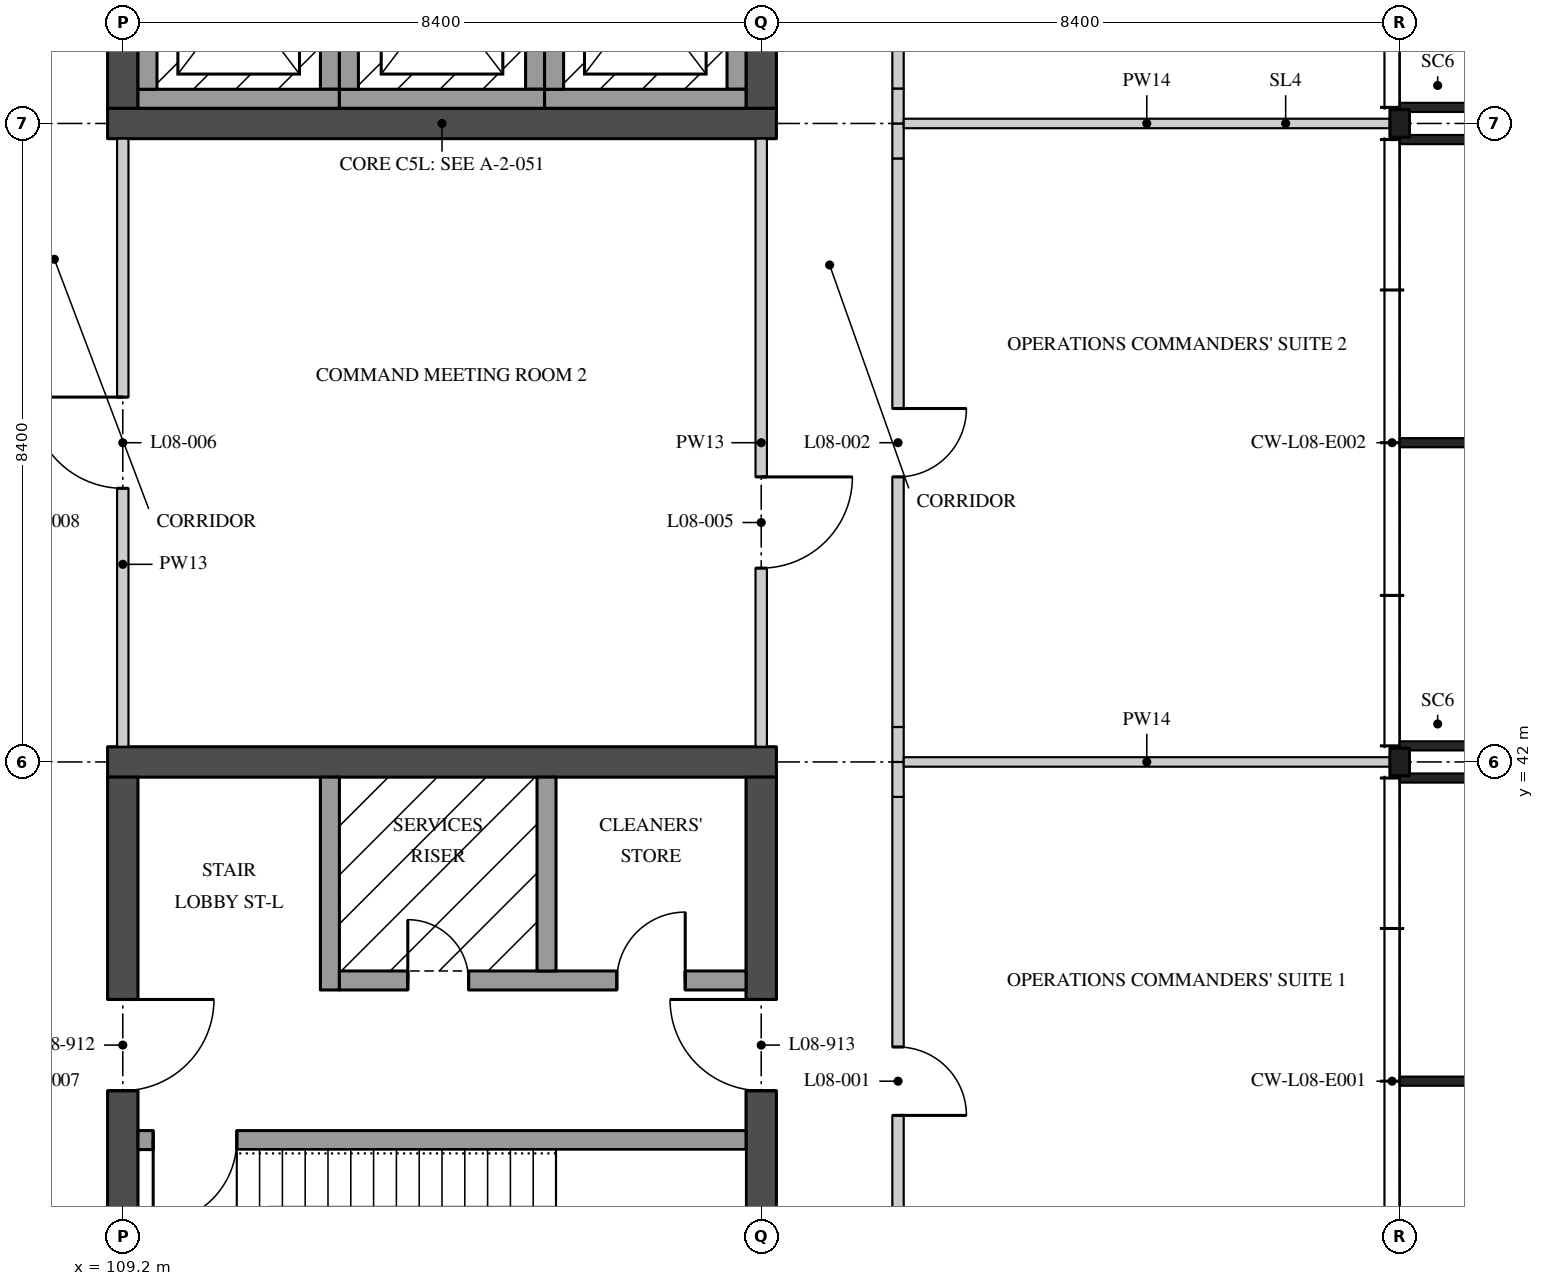
"""IFC4 building model, lengths in metres.
Left out: names, types, materials, properties, quantities, classifications, styles, units other than length and angle.
Written with IfcOpenShell. Run it as: python <this file> out.ifc"""

import sys

from ifc_helpers import new_model, si_unit, direction, frame, frame_2d, origin, origin_2d, place, context, subcontext, project, spatial, rectangle, i_section, extrude, element, fill, save


model = new_model("IFC4")
c1 = context("Model", 3, precision=1e-05, world=origin(), true_north=direction((0.0, 1.0)))
c2 = subcontext(c1, "Body", "Model", "MODEL_VIEW")
j1 = project(units=[si_unit("LENGTHUNIT", "METRE"), si_unit("PLANEANGLEUNIT", "RADIAN")], contexts=[c1])
p1 = place(None, origin())
s1 = spatial("IfcSite", under=j1, at=p1, CompositionType="ELEMENT")
p2 = place(p1, origin())
s2 = spatial("IfcBuilding", under=s1, at=p2, CompositionType="ELEMENT")
p3 = place(p2, frame((0.0, 0.0, 36.9)))
s3 = spatial("IfcBuildingStorey", under=s2, at=p3, CompositionType="ELEMENT", Elevation=36.9)
for number, where, z_axis, x_axis in (
    (1, (126.0, 42.0, 0.0), (0.0, 0.0, 1.0), (1.0, 0.0, 0.0)),
    (2, (126.0, 50.4, 0.0), (0.0, 0.0, 1.0), (1.0, 0.0, 0.0)),
):
    element("IfcColumn", number, at=place(p3, frame(where, z_axis=z_axis, x_axis=x_axis)), inside=s3, PredefinedType="COLUMN", context=c2, shape_type="SweptSolid", body=[
        extrude(i_section(OverallWidth=0.257, OverallDepth=0.363, WebThickness=0.013, FlangeThickness=0.022, FilletRadius=0.015, at=origin_2d()), origin(), (0.0, 0.0, 1.0), 4.37),
    ])
p4 = place(p3, frame((109.0, 50.4, 0.0), z_axis=(0.0, 0.0, 1.0), x_axis=(1.0, 0.0, 0.0)))
e3 = element("IfcWall", 3, at=p4, inside=s3, PredefinedType="SHEAR", context=c2, shape_type="SweptSolid", body=[
    extrude(rectangle(XDim=8.8, YDim=0.4, at=frame_2d((4.4, 0.0))), origin(), (0.0, 0.0, 1.0), 4.37),
])
p5 = place(p3, frame((109.2, 50.6, 0.0), z_axis=(0.0, 0.0, 1.0), x_axis=(0.0, 1.0, 0.0)))
e4 = element("IfcWall", 4, at=p5, inside=s3, PredefinedType="SHEAR", context=c2, shape_type="SweptSolid", body=[
    extrude(rectangle(XDim=8.0, YDim=0.4, at=frame_2d((4.0, 0.0))), origin(), (0.0, 0.0, 1.0), 4.37),
])
p6 = place(p5, frame((3.25, 0.0, 0.0)))
e5 = element("IfcOpeningElement", 5, at=p6, cuts=e4, PredefinedType="OPENING", context=c2, shape_type="SweptSolid", body=[
    extrude(rectangle(XDim=1.2, YDim=2.1, at=frame_2d((0.6, 1.05))), frame((0.0, 0.21, 0.0), z_axis=(0.0, -1.0, 0.0), x_axis=(1.0, 0.0, 0.0)), (0.0, 0.0, 1.0), 0.42),
])
p7 = place(p3, frame((117.6, 50.6, 0.0), z_axis=(0.0, 0.0, 1.0), x_axis=(0.0, 1.0, 0.0)))
e6 = element("IfcWall", 6, at=p7, inside=s3, PredefinedType="SHEAR", context=c2, shape_type="SweptSolid", body=[
    extrude(rectangle(XDim=8.0, YDim=0.4, at=frame_2d((4.0, 0.0))), origin(), (0.0, 0.0, 1.0), 4.37),
])
p8 = place(p7, frame((3.25, 0.0, 0.0)))
e7 = element("IfcOpeningElement", 7, at=p8, cuts=e6, PredefinedType="OPENING", context=c2, shape_type="SweptSolid", body=[
    extrude(rectangle(XDim=1.2, YDim=2.1, at=frame_2d((0.6, 1.05))), frame((0.0, 0.21, 0.0), z_axis=(0.0, -1.0, 0.0), x_axis=(1.0, 0.0, 0.0)), (0.0, 0.0, 1.0), 0.42),
])
p9 = place(p7, frame((6.0, 0.0, 0.0)))
e8 = element("IfcOpeningElement", 8, at=p9, cuts=e6, PredefinedType="OPENING", context=c2, shape_type="SweptSolid", body=[
    extrude(rectangle(XDim=1.2, YDim=2.1, at=frame_2d((0.6, 1.05))), frame((0.0, 0.21, 0.0), z_axis=(0.0, -1.0, 0.0), x_axis=(1.0, 0.0, 0.0)), (0.0, 0.0, 1.0), 0.42),
])
p10 = place(p3, frame((109.0, 42.0, 0.0), z_axis=(0.0, 0.0, 1.0), x_axis=(1.0, 0.0, 0.0)))
e9 = element("IfcWall", 9, at=p10, inside=s3, PredefinedType="SHEAR", context=c2, shape_type="SweptSolid", body=[
    extrude(rectangle(XDim=8.8, YDim=0.4, at=frame_2d((4.4, 0.0))), origin(), (0.0, 0.0, 1.0), 4.37),
])
p11 = place(p3, frame((109.2, 33.8, 0.0), z_axis=(0.0, 0.0, 1.0), x_axis=(0.0, 1.0, 0.0)))
e10 = element("IfcWall", 10, at=p11, inside=s3, PredefinedType="SHEAR", context=c2, shape_type="SweptSolid", body=[
    extrude(rectangle(XDim=8.0, YDim=0.4, at=frame_2d((4.0, 0.0))), origin(), (0.0, 0.0, 1.0), 4.37),
])
p12 = place(p11, frame((3.875, 0.0, 0.0)))
e11 = element("IfcOpeningElement", 11, at=p12, cuts=e10, PredefinedType="OPENING", context=c2, shape_type="SweptSolid", body=[
    extrude(rectangle(XDim=1.2, YDim=2.1, at=frame_2d((0.6, 1.05))), frame((0.0, 0.21, 0.0), z_axis=(0.0, -1.0, 0.0), x_axis=(1.0, 0.0, 0.0)), (0.0, 0.0, 1.0), 0.42),
])
p13 = place(p3, frame((117.6, 33.8, 0.0), z_axis=(0.0, 0.0, 1.0), x_axis=(0.0, 1.0, 0.0)))
e12 = element("IfcWall", 12, at=p13, inside=s3, PredefinedType="SHEAR", context=c2, shape_type="SweptSolid", body=[
    extrude(rectangle(XDim=8.0, YDim=0.4, at=frame_2d((4.0, 0.0))), origin(), (0.0, 0.0, 1.0), 4.37),
])
p14 = place(p13, frame((3.875, 0.0, 0.0)))
e13 = element("IfcOpeningElement", 13, at=p14, cuts=e12, PredefinedType="OPENING", context=c2, shape_type="SweptSolid", body=[
    extrude(rectangle(XDim=1.2, YDim=2.1, at=frame_2d((0.6, 1.05))), frame((0.0, 0.21, 0.0), z_axis=(0.0, -1.0, 0.0), x_axis=(1.0, 0.0, 0.0)), (0.0, 0.0, 1.0), 0.42),
])
p15 = place(p3, frame((109.4, 37.025, 0.0), z_axis=(0.0, 0.0, 1.0), x_axis=(1.0, 0.0, 0.0)))
e14 = element("IfcWall", 14, at=p15, inside=s3, PredefinedType="SOLIDWALL", context=c2, shape_type="SweptSolid", body=[
    extrude(rectangle(XDim=8.0, YDim=0.25, at=frame_2d((4.0, 0.0))), origin(), (0.0, 0.0, 1.0), 4.37),
])
p16 = place(p15, frame((0.2, 0.0, 0.0)))
e15 = element("IfcOpeningElement", 15, at=p16, cuts=e14, PredefinedType="OPENING", context=c2, shape_type="SweptSolid", body=[
    extrude(rectangle(XDim=1.1, YDim=2.1, at=frame_2d((0.55, 1.05))), frame((0.0, 0.135, 0.0), z_axis=(0.0, -1.0, 0.0), x_axis=(1.0, 0.0, 0.0)), (0.0, 0.0, 1.0), 0.27),
])
p17 = place(p3, frame((111.925, 39.0, 0.0), z_axis=(0.0, 0.0, 1.0), x_axis=(0.0, 1.0, 0.0)))
e16 = element("IfcWall", 16, at=p17, inside=s3, PredefinedType="SOLIDWALL", context=c2, shape_type="SweptSolid", body=[
    extrude(rectangle(XDim=2.8, YDim=0.25, at=frame_2d((1.4, 0.0))), origin(), (0.0, 0.0, 1.0), 4.37),
])
p18 = place(p3, frame((112.05, 39.125, 0.0), z_axis=(0.0, 0.0, 1.0), x_axis=(1.0, 0.0, 0.0)))
e17 = element("IfcWall", 17, at=p18, inside=s3, PredefinedType="SOLIDWALL", context=c2, shape_type="SweptSolid", body=[
    extrude(rectangle(XDim=5.35, YDim=0.25, at=frame_2d((2.675, 0.0))), origin(), (0.0, 0.0, 1.0), 4.37),
])
p19 = place(p18, frame((3.65, 0.0, 0.0)))
e18 = element("IfcOpeningElement", 18, at=p19, cuts=e17, PredefinedType="OPENING", context=c2, shape_type="SweptSolid", body=[
    extrude(rectangle(XDim=0.9, YDim=2.1, at=frame_2d((0.45, 1.05))), frame((0.0, 0.135, 0.0), z_axis=(0.0, -1.0, 0.0), x_axis=(1.0, 0.0, 0.0)), (0.0, 0.0, 1.0), 0.27),
])
p20 = place(p18, frame((0.9, 0.0, 0.0)))
e19 = element("IfcOpeningElement", 19, at=p20, cuts=e17, PredefinedType="OPENING", context=c2, shape_type="SweptSolid", body=[
    extrude(rectangle(XDim=0.8, YDim=2.1, at=frame_2d((0.4, 1.05))), frame((0.0, 0.135, 0.0), z_axis=(0.0, -1.0, 0.0), x_axis=(1.0, 0.0, 0.0)), (0.0, 0.0, 1.0), 0.27),
])
p21 = place(p3, frame((114.775, 39.25, 0.0), z_axis=(0.0, 0.0, 1.0), x_axis=(0.0, 1.0, 0.0)))
e20 = element("IfcWall", 20, at=p21, inside=s3, PredefinedType="SOLIDWALL", context=c2, shape_type="SweptSolid", body=[
    extrude(rectangle(XDim=2.55, YDim=0.25, at=frame_2d((1.275, 0.0))), origin(), (0.0, 0.0, 1.0), 4.37),
])
p22 = place(p3, frame((111.925, 50.85, 0.0), z_axis=(0.0, 0.0, 1.0), x_axis=(0.0, 1.0, 0.0)))
e21 = element("IfcWall", 21, at=p22, inside=s3, PredefinedType="SOLIDWALL", context=c2, shape_type="SweptSolid", body=[
    extrude(rectangle(XDim=2.3, YDim=0.25, at=frame_2d((1.15, 0.0))), origin(), (0.0, 0.0, 1.0), 4.37),
])
p23 = place(p3, frame((109.4, 50.725, 0.0), z_axis=(0.0, 0.0, 1.0), x_axis=(1.0, 0.0, 0.0)))
e22 = element("IfcWall", 22, at=p23, inside=s3, PredefinedType="SOLIDWALL", context=c2, shape_type="SweptSolid", body=[
    extrude(rectangle(XDim=2.65, YDim=0.25, at=frame_2d((1.325, 0.0))), origin(), (0.0, 0.0, 1.0), 4.37),
])
for number, where, z_axis, x_axis in (
    (23, (109.525, 50.85, 0.0), (0.0, 0.0, 1.0), (0.0, 1.0, 0.0)),
    (24, (114.625, 50.85, 0.0), (0.0, 0.0, 1.0), (0.0, 1.0, 0.0)),
):
    element("IfcWall", number, at=place(p3, frame(where, z_axis=z_axis, x_axis=x_axis)), inside=s3, PredefinedType="SOLIDWALL", context=c2, shape_type="SweptSolid", body=[
        extrude(rectangle(XDim=2.3, YDim=0.25, at=frame_2d((1.15, 0.0))), origin(), (0.0, 0.0, 1.0), 4.37),
    ])
p24 = place(p3, frame((112.05, 50.725, 0.0), z_axis=(0.0, 0.0, 1.0), x_axis=(1.0, 0.0, 0.0)))
e25 = element("IfcWall", 25, at=p24, inside=s3, PredefinedType="SOLIDWALL", context=c2, shape_type="SweptSolid", body=[
    extrude(rectangle(XDim=2.7, YDim=0.25, at=frame_2d((1.35, 0.0))), origin(), (0.0, 0.0, 1.0), 4.37),
])
for number, where, z_axis, x_axis in (
    (26, (112.175, 50.85, 0.0), (0.0, 0.0, 1.0), (0.0, 1.0, 0.0)),
    (27, (117.275, 50.85, 0.0), (0.0, 0.0, 1.0), (0.0, 1.0, 0.0)),
):
    element("IfcWall", number, at=place(p3, frame(where, z_axis=z_axis, x_axis=x_axis)), inside=s3, PredefinedType="SOLIDWALL", context=c2, shape_type="SweptSolid", body=[
        extrude(rectangle(XDim=2.3, YDim=0.25, at=frame_2d((1.15, 0.0))), origin(), (0.0, 0.0, 1.0), 4.37),
    ])
p25 = place(p3, frame((114.75, 50.725, 0.0), z_axis=(0.0, 0.0, 1.0), x_axis=(1.0, 0.0, 0.0)))
e28 = element("IfcWall", 28, at=p25, inside=s3, PredefinedType="SOLIDWALL", context=c2, shape_type="SweptSolid", body=[
    extrude(rectangle(XDim=2.65, YDim=0.25, at=frame_2d((1.325, 0.0))), origin(), (0.0, 0.0, 1.0), 4.37),
])
p26 = place(p3, frame((114.875, 50.85, 0.0), z_axis=(0.0, 0.0, 1.0), x_axis=(0.0, 1.0, 0.0)))
e29 = element("IfcWall", 29, at=p26, inside=s3, PredefinedType="SOLIDWALL", context=c2, shape_type="SweptSolid", body=[
    extrude(rectangle(XDim=2.3, YDim=0.25, at=frame_2d((1.15, 0.0))), origin(), (0.0, 0.0, 1.0), 4.37),
])
p27 = place(p3, frame((119.4, 33.75, 0.0), z_axis=(0.0, 0.0, 1.0), x_axis=(0.0, 1.0, 0.0)))
e30 = element("IfcWall", 30, at=p27, inside=s3, PredefinedType="PARTITIONING", context=c2, shape_type="SweptSolid", body=[
    extrude(rectangle(XDim=7.79, YDim=0.15, at=frame_2d((3.895, 0.0))), origin(), (0.0, 0.0, 1.0), 4.37),
])
p28 = place(p27, frame((3.6, 0.0, 0.0)))
e31 = element("IfcOpeningElement", 31, at=p28, cuts=e30, PredefinedType="OPENING", context=c2, shape_type="SweptSolid", body=[
    extrude(rectangle(XDim=0.9, YDim=2.1, at=frame_2d((0.45, 1.05))), frame((0.0, 0.085, 0.0), z_axis=(0.0, -1.0, 0.0), x_axis=(1.0, 0.0, 0.0)), (0.0, 0.0, 1.0), 0.17),
])
for number, where, z_axis, x_axis in (
    (32, (119.4, 41.54, 0.0), (0.0, 0.0, 1.0), (0.0, 1.0, 0.0)),
    (33, (119.4, 42.0, 0.0), (0.0, 0.0, 1.0), (0.0, 1.0, 0.0)),
):
    element("IfcWall", number, at=place(p3, frame(where, z_axis=z_axis, x_axis=x_axis)), inside=s3, PredefinedType="PARTITIONING", context=c2, shape_type="SweptSolid", body=[
        extrude(rectangle(XDim=0.46, YDim=0.15, at=frame_2d((0.23, 0.0))), origin(), (0.0, 0.0, 1.0), 3.817),
    ])
p29 = place(p3, frame((119.4, 42.46, 0.0), z_axis=(0.0, 0.0, 1.0), x_axis=(0.0, 1.0, 0.0)))
e34 = element("IfcWall", 34, at=p29, inside=s3, PredefinedType="PARTITIONING", context=c2, shape_type="SweptSolid", body=[
    extrude(rectangle(XDim=7.48, YDim=0.15, at=frame_2d((3.74, 0.0))), origin(), (0.0, 0.0, 1.0), 4.37),
])
p30 = place(p29, frame((3.29, 0.0, 0.0)))
e35 = element("IfcOpeningElement", 35, at=p30, cuts=e34, PredefinedType="OPENING", context=c2, shape_type="SweptSolid", body=[
    extrude(rectangle(XDim=0.9, YDim=2.1, at=frame_2d((0.45, 1.05))), frame((0.0, 0.085, 0.0), z_axis=(0.0, -1.0, 0.0), x_axis=(1.0, 0.0, 0.0)), (0.0, 0.0, 1.0), 0.17),
])
p31 = place(p3, frame((119.4, 49.94, 0.0), z_axis=(0.0, 0.0, 1.0), x_axis=(0.0, 1.0, 0.0)))
e36 = element("IfcWall", 36, at=p31, inside=s3, PredefinedType="PARTITIONING", context=c2, shape_type="SweptSolid", body=[
    extrude(rectangle(XDim=0.46, YDim=0.15, at=frame_2d((0.23, 0.0))), origin(), (0.0, 0.0, 1.0), 3.817),
])
p32 = place(p3, frame((119.4, 50.4, 0.0), z_axis=(0.0, 0.0, 1.0), x_axis=(0.0, 1.0, 0.0)))
e37 = element("IfcWall", 37, at=p32, inside=s3, PredefinedType="PARTITIONING", context=c2, shape_type="SweptSolid", body=[
    extrude(rectangle(XDim=0.46, YDim=0.15, at=frame_2d((0.23, 0.0))), origin(), (0.0, 0.0, 1.0), 3.817),
])
p33 = place(p3, frame((119.4, 50.86, 0.0), z_axis=(0.0, 0.0, 1.0), x_axis=(0.0, 1.0, 0.0)))
e38 = element("IfcWall", 38, at=p33, inside=s3, PredefinedType="PARTITIONING", context=c2, shape_type="SweptSolid", body=[
    extrude(rectangle(XDim=7.48, YDim=0.15, at=frame_2d((3.74, 0.0))), origin(), (0.0, 0.0, 1.0), 4.37),
])
p34 = place(p33, frame((3.29, 0.0, 0.0)))
e39 = element("IfcOpeningElement", 39, at=p34, cuts=e38, PredefinedType="OPENING", context=c2, shape_type="SweptSolid", body=[
    extrude(rectangle(XDim=0.9, YDim=2.1, at=frame_2d((0.45, 1.05))), frame((0.0, 0.085, 0.0), z_axis=(0.0, -1.0, 0.0), x_axis=(1.0, 0.0, 0.0)), (0.0, 0.0, 1.0), 0.17),
])
p35 = place(p3, frame((117.6, 42.2, 0.0), z_axis=(0.0, 0.0, 1.0), x_axis=(0.0, 1.0, 0.0)))
e40 = element("IfcWall", 40, at=p35, inside=s3, PredefinedType="PARTITIONING", context=c2, shape_type="SweptSolid", body=[
    extrude(rectangle(XDim=8.0, YDim=0.15, at=frame_2d((4.0, 0.0))), origin(), (0.0, 0.0, 1.0), 3.817),
])
p36 = place(p35, frame((2.35, 0.0, 0.0)))
e41 = element("IfcOpeningElement", 41, at=p36, cuts=e40, PredefinedType="OPENING", context=c2, shape_type="SweptSolid", body=[
    extrude(rectangle(XDim=1.2, YDim=2.4, at=frame_2d((0.6, 1.2))), frame((0.0, 0.085, 0.0), z_axis=(0.0, -1.0, 0.0), x_axis=(1.0, 0.0, 0.0)), (0.0, 0.0, 1.0), 0.17),
])
p37 = place(p3, frame((109.2, 42.2, 0.0), z_axis=(0.0, 0.0, 1.0), x_axis=(0.0, 1.0, 0.0)))
e42 = element("IfcWall", 42, at=p37, inside=s3, PredefinedType="PARTITIONING", context=c2, shape_type="SweptSolid", body=[
    extrude(rectangle(XDim=8.0, YDim=0.15, at=frame_2d((4.0, 0.0))), origin(), (0.0, 0.0, 1.0), 3.817),
])
p38 = place(p37, frame((3.4, 0.0, 0.0)))
e43 = element("IfcOpeningElement", 43, at=p38, cuts=e42, PredefinedType="OPENING", context=c2, shape_type="SweptSolid", body=[
    extrude(rectangle(XDim=1.2, YDim=2.4, at=frame_2d((0.6, 1.2))), frame((0.0, 0.085, 0.0), z_axis=(0.0, -1.0, 0.0), x_axis=(1.0, 0.0, 0.0)), (0.0, 0.0, 1.0), 0.17),
])
for number, where, z_axis, x_axis in (
    (44, (119.475, 42.0, 0.0), (0.0, 0.0, 1.0), (1.0, 0.0, 0.0)),
    (45, (119.475, 50.4, 0.0), (0.0, 0.0, 1.0), (1.0, 0.0, 0.0)),
):
    element("IfcWall", number, at=place(p3, frame(where, z_axis=z_axis, x_axis=x_axis)), inside=s3, PredefinedType="PARTITIONING", context=c2, shape_type="SweptSolid", body=[
        extrude(rectangle(XDim=6.396, YDim=0.125, at=frame_2d((3.198, 0.0))), origin(), (0.0, 0.0, 1.0), 3.817),
    ])
p39 = place(p19, origin())
e46 = element("IfcDoor", 46, at=p39, inside=s3, OperationType="SINGLE_SWING_LEFT", PredefinedType="DOOR", context=c2, shape_type="SweptSolid", body=[
    extrude(rectangle(XDim=0.9, YDim=2.1, at=frame_2d((0.45, 1.05))), frame((0.0, 0.035, 0.0), z_axis=(0.0, -1.0, 0.0), x_axis=(1.0, 0.0, 0.0)), (0.0, 0.0, 1.0), 0.07),
])
fill(e18, e46)
p40 = place(p12, frame((1.2, 0.0, 0.0), z_axis=(0.0, 0.0, 1.0), x_axis=(-1.0, 0.0, 0.0)))
e47 = element("IfcDoor", 47, at=p40, inside=s3, OperationType="SINGLE_SWING_RIGHT", PredefinedType="DOOR", context=c2, shape_type="SweptSolid", body=[
    extrude(rectangle(XDim=1.2, YDim=2.1, at=frame_2d((0.6, 1.05))), frame((0.0, 0.035, 0.0), z_axis=(0.0, -1.0, 0.0), x_axis=(1.0, 0.0, 0.0)), (0.0, 0.0, 1.0), 0.07),
])
fill(e11, e47)
p41 = place(p14, origin())
e48 = element("IfcDoor", 48, at=p41, inside=s3, OperationType="SINGLE_SWING_LEFT", PredefinedType="DOOR", context=c2, shape_type="SweptSolid", body=[
    extrude(rectangle(XDim=1.2, YDim=2.1, at=frame_2d((0.6, 1.05))), frame((0.0, 0.035, 0.0), z_axis=(0.0, -1.0, 0.0), x_axis=(1.0, 0.0, 0.0)), (0.0, 0.0, 1.0), 0.07),
])
fill(e13, e48)
p42 = place(p20, origin())
e49 = element("IfcDoor", 49, at=p42, inside=s3, OperationType="SINGLE_SWING_RIGHT", PredefinedType="DOOR", context=c2, shape_type="SweptSolid", body=[
    extrude(rectangle(XDim=0.8, YDim=2.1, at=frame_2d((0.4, 1.05))), frame((0.0, 0.035, 0.0), z_axis=(0.0, -1.0, 0.0), x_axis=(1.0, 0.0, 0.0)), (0.0, 0.0, 1.0), 0.07),
])
fill(e19, e49)
p43 = place(p16, frame((1.1, 0.0, 0.0), z_axis=(0.0, 0.0, 1.0), x_axis=(-1.0, 0.0, 0.0)))
e50 = element("IfcDoor", 50, at=p43, inside=s3, OperationType="SINGLE_SWING_LEFT", PredefinedType="DOOR", context=c2, shape_type="SweptSolid", body=[
    extrude(rectangle(XDim=1.1, YDim=2.1, at=frame_2d((0.55, 1.05))), frame((0.0, 0.035, 0.0), z_axis=(0.0, -1.0, 0.0), x_axis=(1.0, 0.0, 0.0)), (0.0, 0.0, 1.0), 0.07),
])
fill(e15, e50)
p44 = place(p28, frame((0.9, 0.0, 0.0), z_axis=(0.0, 0.0, 1.0), x_axis=(-1.0, 0.0, 0.0)))
e51 = element("IfcDoor", 51, at=p44, inside=s3, OperationType="SINGLE_SWING_LEFT", PredefinedType="DOOR", context=c2, shape_type="SweptSolid", body=[
    extrude(rectangle(XDim=0.9, YDim=2.1, at=frame_2d((0.45, 1.05))), frame((0.0, 0.025, 0.0), z_axis=(0.0, -1.0, 0.0), x_axis=(1.0, 0.0, 0.0)), (0.0, 0.0, 1.0), 0.05),
])
fill(e31, e51)
p45 = place(p30, frame((0.9, 0.0, 0.0), z_axis=(0.0, 0.0, 1.0), x_axis=(-1.0, 0.0, 0.0)))
e52 = element("IfcDoor", 52, at=p45, inside=s3, OperationType="SINGLE_SWING_RIGHT", PredefinedType="DOOR", context=c2, shape_type="SweptSolid", body=[
    extrude(rectangle(XDim=0.9, YDim=2.1, at=frame_2d((0.45, 1.05))), frame((0.0, 0.025, 0.0), z_axis=(0.0, -1.0, 0.0), x_axis=(1.0, 0.0, 0.0)), (0.0, 0.0, 1.0), 0.05),
])
fill(e35, e52)
p46 = place(p36, frame((1.2, 0.0, 0.0), z_axis=(0.0, 0.0, 1.0), x_axis=(-1.0, 0.0, 0.0)))
e53 = element("IfcDoor", 53, at=p46, inside=s3, OperationType="SINGLE_SWING_RIGHT", PredefinedType="DOOR", context=c2, shape_type="SweptSolid", body=[
    extrude(rectangle(XDim=1.2, YDim=2.4, at=frame_2d((0.6, 1.2))), frame((0.0, 0.025, 0.0), z_axis=(0.0, -1.0, 0.0), x_axis=(1.0, 0.0, 0.0)), (0.0, 0.0, 1.0), 0.05),
])
fill(e41, e53)
p47 = place(p38, origin())
e54 = element("IfcDoor", 54, at=p47, inside=s3, OperationType="SINGLE_SWING_LEFT", PredefinedType="DOOR", context=c2, shape_type="SweptSolid", body=[
    extrude(rectangle(XDim=1.2, YDim=2.4, at=frame_2d((0.6, 1.2))), frame((0.0, 0.025, 0.0), z_axis=(0.0, -1.0, 0.0), x_axis=(1.0, 0.0, 0.0)), (0.0, 0.0, 1.0), 0.05),
])
fill(e43, e54)
save(model, sys.argv[1])
